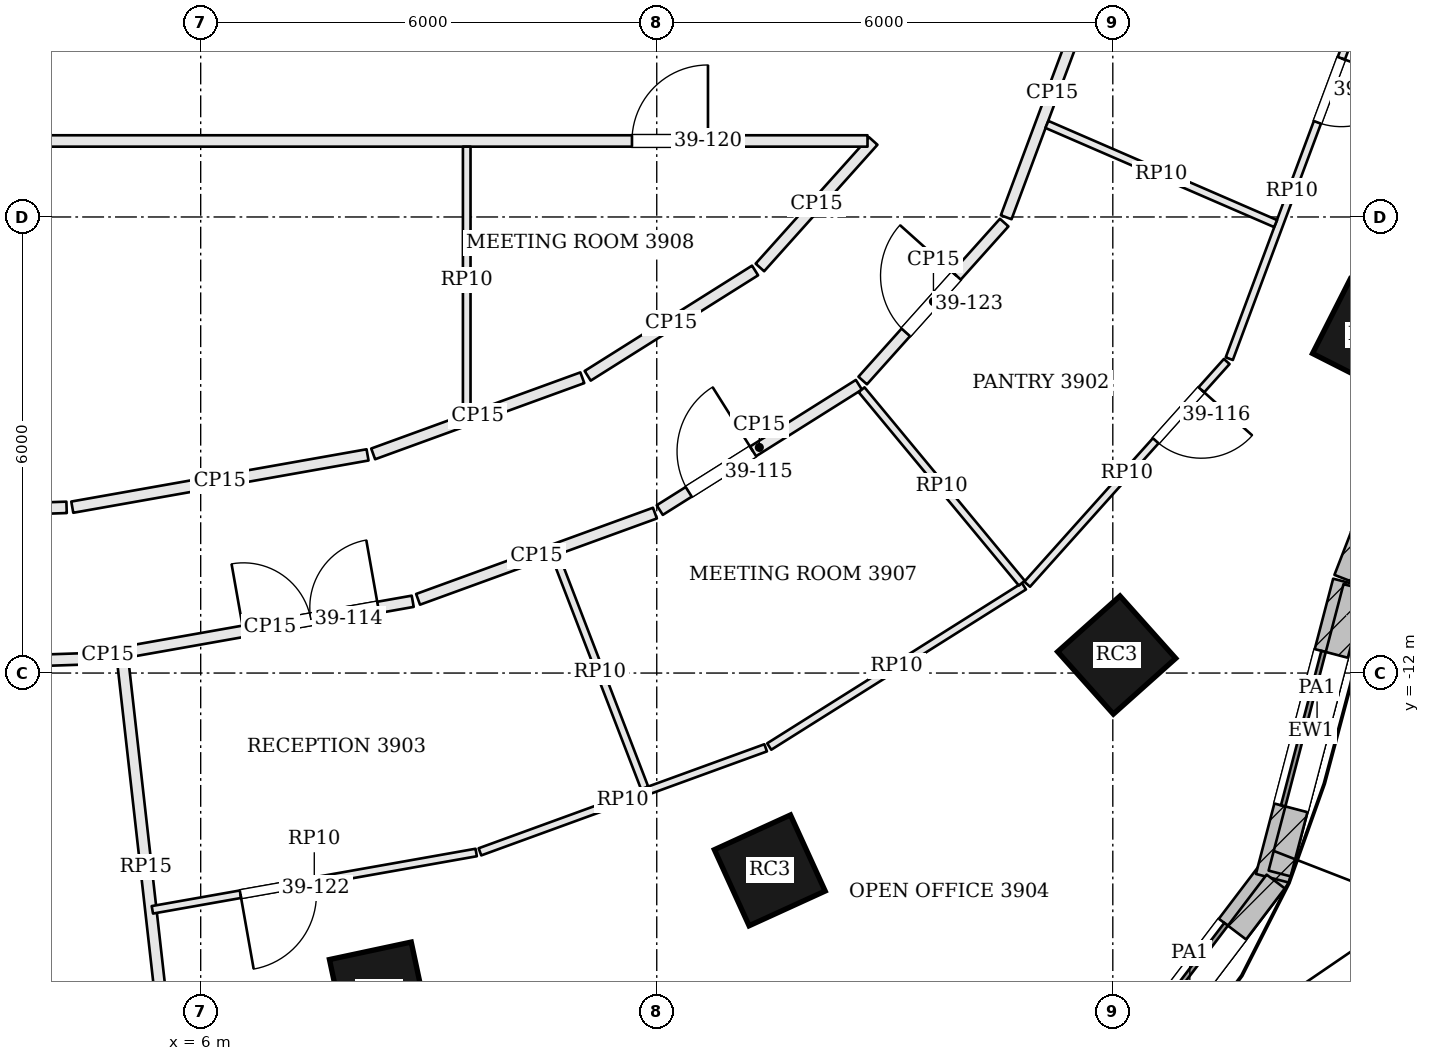
"""IFC4 building model, lengths in metres.
Left out: names, types, materials, properties, quantities, classifications, styles, units other than length and angle.
Written with IfcOpenShell. Run it as: python <this file> out.ifc"""

import sys

from ifc_helpers import new_model, si_unit, direction, frame, frame_2d, origin, origin_2d, place, context, subcontext, project, spatial, rectangle, extrude, element, fill, save


model = new_model("IFC4")
c1 = context("Model", 3, precision=1e-05, world=origin(), true_north=direction((0.0, 1.0)))
c2 = subcontext(c1, "Body", "Model", "MODEL_VIEW")
j1 = project(units=[si_unit("LENGTHUNIT", "METRE"), si_unit("PLANEANGLEUNIT", "RADIAN")], contexts=[c1])
p1 = place(None, origin())
s1 = spatial("IfcSite", under=j1, at=p1, CompositionType="ELEMENT")
p2 = place(p1, origin())
s2 = spatial("IfcBuilding", under=s1, at=p2, CompositionType="ELEMENT")
p3 = place(p2, frame((0.0, 0.0, 161.7)))
s3 = spatial("IfcBuildingStorey", under=s2, at=p3, CompositionType="ELEMENT", Elevation=161.7)
for number, where, z_axis, x_axis in (
    (1, (8.347, -16.192, 0.0), (0.0, 0.0, 1.0), (0.978, 0.209, 0.0)),
    (2, (13.487, -14.596, 0.0), (0.0, 0.0, 1.0), (0.91, 0.415, 0.0)),
    (3, (18.051, -11.763, 0.0), (0.0, 0.0, 1.0), (0.746, 0.666, 0.0)),
    (4, (21.367, -7.554, 0.0), (0.0, 0.0, 1.0), (0.452, 0.892, 0.0)),
):
    element("IfcColumn", number, at=place(p3, frame(where, z_axis=z_axis, x_axis=x_axis)), inside=s3, PredefinedType="COLUMN", context=c2, shape_type="SweptSolid", body=[
        extrude(rectangle(XDim=1.1, YDim=1.1, at=origin_2d()), origin(), (0.0, 0.0, 1.0), 3.9),
    ])
p4 = place(p3, frame((17.741, -17.784, 0.0), z_axis=(0.0, 0.0, 1.0), x_axis=(0.604591324894, 0.796535830872, 0.0)))
e5 = element("IfcWall", 5, at=p4, inside=s3, PredefinedType="SOLIDWALL", context=c2, shape_type="SweptSolid", body=[
    extrude(rectangle(XDim=3.965, YDim=0.45, at=frame_2d((1.982, 0.0))), origin(), (0.0, 0.0, 1.0), 3.7),
])
p5 = place(p4, frame((0.932, 0.0, 0.9)))
e6 = element("IfcOpeningElement", 6, at=p5, cuts=e5, PredefinedType="OPENING", context=c2, shape_type="SweptSolid", body=[
    extrude(rectangle(XDim=2.1, YDim=2.3, at=frame_2d((1.05, 1.15))), frame((0.0, 0.235, 0.0), z_axis=(0.0, -1.0, 0.0), x_axis=(1.0, 0.0, 0.0)), (0.0, 0.0, 1.0), 0.47),
])
p6 = place(p3, frame((20.101, -14.7, 0.0), z_axis=(0.0, 0.0, 1.0), x_axis=(0.253050507365, 0.967453069003, 0.0)))
e7 = element("IfcWall", 7, at=p6, inside=s3, PredefinedType="SOLIDWALL", context=c2, shape_type="SweptSolid", body=[
    extrude(rectangle(XDim=4.015, YDim=0.45, at=frame_2d((2.008, 0.0))), origin(), (0.0, 0.0, 1.0), 3.7),
])
p7 = place(p6, frame((0.958, 0.0, 0.9)))
e8 = element("IfcOpeningElement", 8, at=p7, cuts=e7, PredefinedType="OPENING", context=c2, shape_type="SweptSolid", body=[
    extrude(rectangle(XDim=2.1, YDim=2.3, at=frame_2d((1.05, 1.15))), frame((0.0, 0.235, 0.0), z_axis=(0.0, -1.0, 0.0), x_axis=(1.0, 0.0, 0.0)), (0.0, 0.0, 1.0), 0.47),
])
p8 = place(p3, frame((21.125, -10.79, 0.0), z_axis=(0.0, 0.0, 1.0), x_axis=(0.361550075906, 0.932352692178, 0.0)))
e9 = element("IfcWall", 9, at=p8, inside=s3, PredefinedType="SOLIDWALL", context=c2, shape_type="SweptSolid", body=[
    extrude(rectangle(XDim=3.313, YDim=0.45, at=frame_2d((1.657, 0.0))), origin(), (0.0, 0.0, 1.0), 3.7),
])
p9 = place(p8, frame((0.607, 0.0, 0.9)))
e10 = element("IfcOpeningElement", 10, at=p9, cuts=e9, PredefinedType="OPENING", context=c2, shape_type="SweptSolid", body=[
    extrude(rectangle(XDim=2.1, YDim=2.3, at=frame_2d((1.05, 1.15))), frame((0.0, 0.235, 0.0), z_axis=(0.0, -1.0, 0.0), x_axis=(1.0, 0.0, 0.0)), (0.0, 0.0, 1.0), 0.47),
])
p10 = place(p3, frame((17.883, -17.721, 3.9), z_axis=(0.0, 0.0, 1.0), x_axis=(0.60459800049, 0.796530763878, 0.0)))
e11 = element("IfcWall", 11, at=p10, inside=s3, PredefinedType="PARAPET", context=c2, shape_type="SweptSolid", body=[
    extrude(rectangle(XDim=3.739, YDim=0.3, at=frame_2d((1.869, 0.0))), origin(), (0.0, 0.0, 1.0), 1.1),
])
p11 = place(p3, frame((20.195, -14.637, 3.9), z_axis=(0.0, 0.0, 1.0), x_axis=(0.253006085487, 0.967464687059, 0.0)))
e12 = element("IfcWall", 12, at=p11, inside=s3, PredefinedType="PARAPET", context=c2, shape_type="SweptSolid", body=[
    extrude(rectangle(XDim=3.896, YDim=0.3, at=frame_2d((1.948, 0.0))), origin(), (0.0, 0.0, 1.0), 1.1),
])
p12 = place(p3, frame((-0.875, -11.993, 0.0), z_axis=(0.0, 0.0, 1.0), x_axis=(0.999436745295, 0.033558786542, 0.0)))
e13 = element("IfcWall", 13, at=p12, inside=s3, PredefinedType="PARTITIONING", context=c2, shape_type="SweptSolid", body=[
    extrude(rectangle(XDim=5.398, YDim=0.15, at=frame_2d((2.699, 0.0))), origin(), (0.0, 0.0, 1.0), 3.198),
])
p13 = place(p3, frame((4.594, -11.799, 0.0), z_axis=(0.0, 0.0, 1.0), x_axis=(0.9846521594, 0.174528292804, 0.0)))
e14 = element("IfcWall", 14, at=p13, inside=s3, PredefinedType="PARTITIONING", context=c2, shape_type="SweptSolid", body=[
    extrude(rectangle(XDim=0.375, YDim=0.15, at=frame_2d((0.188, 0.0))), origin(), (0.0, 0.0, 1.0), 3.198),
])
p14 = place(p3, frame((5.59, -17.294, 0.0), z_axis=(0.0, 0.0, 1.0), x_axis=(-0.112008739425, 0.993707221616, 0.0)))
e15 = element("IfcWall", 15, at=p14, inside=s3, PredefinedType="PARTITIONING", context=c2, shape_type="SweptSolid", body=[
    extrude(rectangle(XDim=5.521, YDim=0.15, at=frame_2d((2.76, 0.0))), origin(), (0.0, 0.0, 1.0), 3.234),
])
p15 = place(p3, frame((5.037, -11.72, 0.0), z_axis=(0.0, 0.0, 1.0), x_axis=(0.984690550414, 0.17431155993, 0.0)))
e16 = element("IfcWall", 16, at=p15, inside=s3, PredefinedType="PARTITIONING", context=c2, shape_type="SweptSolid", body=[
    extrude(rectangle(XDim=3.811, YDim=0.15, at=frame_2d((1.906, 0.0))), origin(), (0.0, 0.0, 1.0), 3.198),
])
p16 = place(p15, frame((1.55, 0.0, 0.0)))
e17 = element("IfcOpeningElement", 17, at=p16, cuts=e16, PredefinedType="OPENING", context=c2, shape_type="SweptSolid", body=[
    extrude(rectangle(XDim=1.8, YDim=2.1, at=frame_2d((0.9, 1.05))), frame((0.0, 0.085, 0.0), z_axis=(0.0, -1.0, 0.0), x_axis=(1.0, 0.0, 0.0)), (0.0, 0.0, 1.0), 0.17),
])
p17 = place(p3, frame((8.86, -11.03, 0.0), z_axis=(0.0, 0.0, 1.0), x_axis=(0.939685902536, 0.342038601001, 0.0)))
e18 = element("IfcWall", 18, at=p17, inside=s3, PredefinedType="PARTITIONING", context=c2, shape_type="SweptSolid", body=[
    extrude(rectangle(XDim=3.316, YDim=0.15, at=frame_2d((1.658, 0.0))), origin(), (0.0, 0.0, 1.0), 3.198),
])
p18 = place(p3, frame((12.04, -9.856, 0.0), z_axis=(0.0, 0.0, 1.0), x_axis=(0.846394809937, 0.532555936697, 0.0)))
e19 = element("IfcWall", 19, at=p18, inside=s3, PredefinedType="PARTITIONING", context=c2, shape_type="SweptSolid", body=[
    extrude(rectangle(XDim=3.095, YDim=0.15, at=frame_2d((1.548, 0.0))), origin(), (0.0, 0.0, 1.0), 3.198),
])
p19 = place(p18, frame((0.45, 0.0, 0.0)))
e20 = element("IfcOpeningElement", 20, at=p19, cuts=e19, PredefinedType="OPENING", context=c2, shape_type="SweptSolid", body=[
    extrude(rectangle(XDim=1.0, YDim=2.4, at=frame_2d((0.5, 1.2))), frame((0.0, 0.085, 0.0), z_axis=(0.0, -1.0, 0.0), x_axis=(1.0, 0.0, 0.0)), (0.0, 0.0, 1.0), 0.17),
])
p20 = place(p3, frame((14.709, -8.152, 0.0), z_axis=(0.0, 0.0, 1.0), x_axis=(0.667275630306, 0.744810870758, 0.0)))
e21 = element("IfcWall", 21, at=p20, inside=s3, PredefinedType="PARTITIONING", context=c2, shape_type="SweptSolid", body=[
    extrude(rectangle(XDim=2.79, YDim=0.15, at=frame_2d((1.395, 0.0))), origin(), (0.0, 0.0, 1.0), 3.198),
])
p21 = place(p20, frame((0.85, 0.0, 0.0)))
e22 = element("IfcOpeningElement", 22, at=p21, cuts=e21, PredefinedType="OPENING", context=c2, shape_type="SweptSolid", body=[
    extrude(rectangle(XDim=1.0, YDim=2.1, at=frame_2d((0.5, 1.05))), frame((0.0, 0.085, 0.0), z_axis=(0.0, -1.0, 0.0), x_axis=(1.0, 0.0, 0.0)), (0.0, 0.0, 1.0), 0.17),
])
p22 = place(p3, frame((16.597, -6.003, 0.0), z_axis=(0.0, 0.0, 1.0), x_axis=(0.349499455299, 0.936936567088, 0.0)))
e23 = element("IfcWall", 23, at=p22, inside=s3, PredefinedType="PARTITIONING", context=c2, shape_type="SweptSolid", body=[
    extrude(rectangle(XDim=3.477, YDim=0.15, at=frame_2d((1.739, 0.0))), origin(), (0.0, 0.0, 1.0), 3.198),
])
p23 = place(p3, frame((14.848, -5.0, 0.0), z_axis=(0.0, 0.0, 1.0), x_axis=(-0.667363249373, -0.744732363595, 0.0)))
e24 = element("IfcWall", 24, at=p23, inside=s3, PredefinedType="PARTITIONING", context=c2, shape_type="SweptSolid", body=[
    extrude(rectangle(XDim=2.234, YDim=0.15, at=frame_2d((1.117, 0.0))), origin(), (0.0, 0.0, 1.0), 3.198),
])
p24 = place(p3, frame((13.293, -6.704, 0.0), z_axis=(0.0, 0.0, 1.0), x_axis=(-0.84641299998, -0.532527026041, 0.0)))
e25 = element("IfcWall", 25, at=p24, inside=s3, PredefinedType="PARTITIONING", context=c2, shape_type="SweptSolid", body=[
    extrude(rectangle(XDim=2.602, YDim=0.15, at=frame_2d((1.301, 0.0))), origin(), (0.0, 0.0, 1.0), 3.198),
])
p25 = place(p3, frame((11.021, -8.115, 0.0), z_axis=(0.0, 0.0, 1.0), x_axis=(-0.939683845313, -0.342044252778, 0.0)))
e26 = element("IfcWall", 26, at=p25, inside=s3, PredefinedType="PARTITIONING", context=c2, shape_type="SweptSolid", body=[
    extrude(rectangle(XDim=2.929, YDim=0.15, at=frame_2d((1.464, 0.0))), origin(), (0.0, 0.0, 1.0), 3.198),
])
p26 = place(p3, frame((8.195, -9.13, 0.0), z_axis=(0.0, 0.0, 1.0), x_axis=(-0.9846880937, -0.174325437403, 0.0)))
e27 = element("IfcWall", 27, at=p26, inside=s3, PredefinedType="PARTITIONING", context=c2, shape_type="SweptSolid", body=[
    extrude(rectangle(XDim=3.945, YDim=0.15, at=frame_2d((1.973, 0.0))), origin(), (0.0, 0.0, 1.0), 3.198),
])
p27 = place(p3, frame((4.236, -9.82, 0.0), z_axis=(0.0, 0.0, 1.0), x_axis=(-0.999435760561, -0.033588100749, 0.0)))
e28 = element("IfcWall", 28, at=p27, inside=s3, PredefinedType="PARTITIONING", context=c2, shape_type="SweptSolid", body=[
    extrude(rectangle(XDim=5.146, YDim=0.15, at=frame_2d((2.573, 0.0))), origin(), (0.0, 0.0, 1.0), 3.198),
])
p28 = place(p3, frame((-14.789, -5.0, 0.0), z_axis=(0.0, 0.0, 1.0), x_axis=(1.0, 0.0, 0.0)))
e29 = element("IfcWall", 29, at=p28, inside=s3, PredefinedType="PARTITIONING", context=c2, shape_type="SweptSolid", body=[
    extrude(rectangle(XDim=29.562, YDim=0.15, at=frame_2d((14.781, 0.0))), origin(), (0.0, 0.0, 1.0), 3.198),
])
p29 = place(p28, frame((2.107, 0.0, 0.0)))
e30 = element("IfcOpeningElement", 30, at=p29, cuts=e29, PredefinedType="OPENING", context=c2, shape_type="SweptSolid", body=[
    extrude(rectangle(XDim=1.0, YDim=2.1, at=frame_2d((0.5, 1.05))), frame((0.0, 0.085, 0.0), z_axis=(0.0, -1.0, 0.0), x_axis=(1.0, 0.0, 0.0)), (0.0, 0.0, 1.0), 0.17),
])
p30 = place(p28, frame((13.889, 0.0, 0.0)))
e31 = element("IfcOpeningElement", 31, at=p30, cuts=e29, PredefinedType="OPENING", context=c2, shape_type="SweptSolid", body=[
    extrude(rectangle(XDim=1.8, YDim=2.1, at=frame_2d((0.9, 1.05))), frame((0.0, 0.085, 0.0), z_axis=(0.0, -1.0, 0.0), x_axis=(1.0, 0.0, 0.0)), (0.0, 0.0, 1.0), 0.17),
])
p31 = place(p28, frame((26.463, 0.0, 0.0)))
e32 = element("IfcOpeningElement", 32, at=p31, cuts=e29, PredefinedType="OPENING", context=c2, shape_type="SweptSolid", body=[
    extrude(rectangle(XDim=1.0, YDim=2.4, at=frame_2d((0.5, 1.2))), frame((0.0, 0.085, 0.0), z_axis=(0.0, -1.0, 0.0), x_axis=(1.0, 0.0, 0.0)), (0.0, 0.0, 1.0), 0.17),
])
p32 = place(p3, frame((21.181, -3.443, 0.0), z_axis=(0.0, 0.0, 1.0), x_axis=(-0.349438657616, -0.936959243811, 0.0)))
e33 = element("IfcWall", 33, at=p32, inside=s3, PredefinedType="PARTITIONING", context=c2, shape_type="SweptSolid", body=[
    extrude(rectangle(XDim=4.718, YDim=0.1, at=frame_2d((2.359, 0.0))), origin(), (0.0, 0.0, 1.0), 3.198),
])
p33 = place(p32, frame((0.5, 0.0, 0.0)))
e34 = element("IfcOpeningElement", 34, at=p33, cuts=e33, PredefinedType="OPENING", context=c2, shape_type="SweptSolid", body=[
    extrude(rectangle(XDim=0.9, YDim=2.1, at=frame_2d((0.45, 1.05))), frame((0.0, 0.06, 0.0), z_axis=(0.0, -1.0, 0.0), x_axis=(1.0, 0.0, 0.0)), (0.0, 0.0, 1.0), 0.12),
])
p34 = place(p3, frame((19.499, -7.901, 0.0), z_axis=(0.0, 0.0, 1.0), x_axis=(-0.667320762971, -0.744770433964, 0.0)))
e35 = element("IfcWall", 35, at=p34, inside=s3, PredefinedType="PARTITIONING", context=c2, shape_type="SweptSolid", body=[
    extrude(rectangle(XDim=3.934, YDim=0.1, at=frame_2d((1.967, 0.0))), origin(), (0.0, 0.0, 1.0), 3.198),
])
p35 = place(p34, frame((0.5, 0.0, 0.0)))
e36 = element("IfcOpeningElement", 36, at=p35, cuts=e35, PredefinedType="OPENING", context=c2, shape_type="SweptSolid", body=[
    extrude(rectangle(XDim=0.9, YDim=2.1, at=frame_2d((0.45, 1.05))), frame((0.0, 0.06, 0.0), z_axis=(0.0, -1.0, 0.0), x_axis=(1.0, 0.0, 0.0)), (0.0, 0.0, 1.0), 0.12),
])
p36 = place(p3, frame((16.831, -10.858, 0.0), z_axis=(0.0, 0.0, 1.0), x_axis=(-0.846415033443, -0.532523793987, 0.0)))
e37 = element("IfcWall", 37, at=p36, inside=s3, PredefinedType="PARTITIONING", context=c2, shape_type="SweptSolid", body=[
    extrude(rectangle(XDim=3.96, YDim=0.1, at=frame_2d((1.98, 0.0))), origin(), (0.0, 0.0, 1.0), 3.198),
])
p37 = place(p3, frame((13.433, -12.984, 0.0), z_axis=(0.0, 0.0, 1.0), x_axis=(-0.939673979614, -0.342071355182, 0.0)))
e38 = element("IfcWall", 38, at=p37, inside=s3, PredefinedType="PARTITIONING", context=c2, shape_type="SweptSolid", body=[
    extrude(rectangle(XDim=4.0, YDim=0.1, at=frame_2d((2.0, 0.0))), origin(), (0.0, 0.0, 1.0), 3.198),
])
p38 = place(p3, frame((9.625, -14.361, 0.0), z_axis=(0.0, 0.0, 1.0), x_axis=(-0.984692536401, -0.174300340665, 0.0)))
e39 = element("IfcWall", 39, at=p38, inside=s3, PredefinedType="PARTITIONING", context=c2, shape_type="SweptSolid", body=[
    extrude(rectangle(XDim=4.327, YDim=0.1, at=frame_2d((2.163, 0.0))), origin(), (0.0, 0.0, 1.0), 3.198),
])
p39 = place(p38, frame((2.15, 0.0, 0.0)))
e40 = element("IfcOpeningElement", 40, at=p39, cuts=e39, PredefinedType="OPENING", context=c2, shape_type="SweptSolid", body=[
    extrude(rectangle(XDim=1.0, YDim=2.1, at=frame_2d((0.5, 1.05))), frame((0.0, 0.06, 0.0), z_axis=(0.0, -1.0, 0.0), x_axis=(1.0, 0.0, 0.0)), (0.0, 0.0, 1.0), 0.12),
])
p40 = place(p3, frame((10.663, -10.454, 0.0), z_axis=(0.0, 0.0, 1.0), x_axis=(0.359408579013, -0.933180300548, 0.0)))
e41 = element("IfcWall", 41, at=p40, inside=s3, PredefinedType="PARTITIONING", context=c2, shape_type="SweptSolid", body=[
    extrude(rectangle(XDim=3.275, YDim=0.1, at=frame_2d((1.638, 0.0))), origin(), (0.0, 0.0, 1.0), 3.198),
])
p41 = place(p3, frame((14.695, -8.273, 0.0), z_axis=(0.0, 0.0, 1.0), x_axis=(0.638037892731, -0.770004965854, 0.0)))
e42 = element("IfcWall", 42, at=p41, inside=s3, PredefinedType="PARTITIONING", context=c2, shape_type="SweptSolid", body=[
    extrude(rectangle(XDim=3.304, YDim=0.1, at=frame_2d((1.652, 0.0))), origin(), (0.0, 0.0, 1.0), 3.198),
])
p42 = place(p3, frame((17.133, -4.782, 0.0), z_axis=(0.0, 0.0, 1.0), x_axis=(0.917457823469, -0.397833058148, 0.0)))
e43 = element("IfcWall", 43, at=p42, inside=s3, PredefinedType="PARTITIONING", context=c2, shape_type="SweptSolid", body=[
    extrude(rectangle(XDim=3.28, YDim=0.1, at=frame_2d((1.64, 0.0))), origin(), (0.0, 0.0, 1.0), 3.198),
])
p43 = place(p3, frame((9.5, -8.594, 0.0), z_axis=(0.0, 0.0, 1.0), x_axis=(0.0, 1.0, 0.0)))
e44 = element("IfcWall", 44, at=p43, inside=s3, PredefinedType="PARTITIONING", context=c2, shape_type="SweptSolid", body=[
    extrude(rectangle(XDim=3.519, YDim=0.1, at=frame_2d((1.759, 0.0))), origin(), (0.0, 0.0, 1.0), 3.198),
])
p44 = place(p5, origin())
e45 = element("IfcWindow", 45, at=p44, inside=s3, PartitioningType="SINGLE_PANEL", PredefinedType="WINDOW", context=c2, shape_type="SweptSolid", body=[
    extrude(rectangle(XDim=2.1, YDim=2.3, at=frame_2d((1.05, 1.15))), frame((0.0, 0.135, 0.0), z_axis=(0.0, -1.0, 0.0), x_axis=(1.0, 0.0, 0.0)), (0.0, 0.0, 1.0), 0.06),
])
fill(e6, e45)
p45 = place(p7, origin())
e46 = element("IfcWindow", 46, at=p45, inside=s3, PartitioningType="SINGLE_PANEL", PredefinedType="WINDOW", context=c2, shape_type="SweptSolid", body=[
    extrude(rectangle(XDim=2.1, YDim=2.3, at=frame_2d((1.05, 1.15))), frame((0.0, 0.135, 0.0), z_axis=(0.0, -1.0, 0.0), x_axis=(1.0, 0.0, 0.0)), (0.0, 0.0, 1.0), 0.06),
])
fill(e8, e46)
p46 = place(p16, origin())
e47 = element("IfcDoor", 47, at=p46, inside=s3, OperationType="DOUBLE_DOOR_SINGLE_SWING", PredefinedType="DOOR", context=c2, shape_type="SweptSolid", body=[
    extrude(rectangle(XDim=1.8, YDim=2.1, at=frame_2d((0.9, 1.05))), frame((0.0, 0.025, 0.0), z_axis=(0.0, -1.0, 0.0), x_axis=(1.0, 0.0, 0.0)), (0.0, 0.0, 1.0), 0.05),
])
fill(e17, e47)
p47 = place(p19, origin())
e48 = element("IfcDoor", 48, at=p47, inside=s3, OperationType="SINGLE_SWING_RIGHT", PredefinedType="DOOR", context=c2, shape_type="SweptSolid", body=[
    extrude(rectangle(XDim=1.0, YDim=2.4, at=frame_2d((0.5, 1.2))), frame((0.0, 0.025, 0.0), z_axis=(0.0, -1.0, 0.0), x_axis=(1.0, 0.0, 0.0)), (0.0, 0.0, 1.0), 0.05),
])
fill(e20, e48)
p48 = place(p35, origin())
e49 = element("IfcDoor", 49, at=p48, inside=s3, OperationType="SINGLE_SWING_LEFT", PredefinedType="DOOR", context=c2, shape_type="SweptSolid", body=[
    extrude(rectangle(XDim=0.9, YDim=2.1, at=frame_2d((0.45, 1.05))), frame((0.0, 0.025, 0.0), z_axis=(0.0, -1.0, 0.0), x_axis=(1.0, 0.0, 0.0)), (0.0, 0.0, 1.0), 0.05),
])
fill(e36, e49)
p49 = place(p33, origin())
e50 = element("IfcDoor", 50, at=p49, inside=s3, OperationType="SINGLE_SWING_LEFT", PredefinedType="DOOR", context=c2, shape_type="SweptSolid", body=[
    extrude(rectangle(XDim=0.9, YDim=2.1, at=frame_2d((0.45, 1.05))), frame((0.0, 0.025, 0.0), z_axis=(0.0, -1.0, 0.0), x_axis=(1.0, 0.0, 0.0)), (0.0, 0.0, 1.0), 0.05),
])
fill(e34, e50)
p50 = place(p31, origin())
e51 = element("IfcDoor", 51, at=p50, inside=s3, OperationType="SINGLE_SWING_RIGHT", PredefinedType="DOOR", context=c2, shape_type="SweptSolid", body=[
    extrude(rectangle(XDim=1.0, YDim=2.4, at=frame_2d((0.5, 1.2))), frame((0.0, 0.025, 0.0), z_axis=(0.0, -1.0, 0.0), x_axis=(1.0, 0.0, 0.0)), (0.0, 0.0, 1.0), 0.05),
])
fill(e32, e51)
p51 = place(p39, origin())
e52 = element("IfcDoor", 52, at=p51, inside=s3, OperationType="SINGLE_SWING_RIGHT", PredefinedType="DOOR", context=c2, shape_type="SweptSolid", body=[
    extrude(rectangle(XDim=1.0, YDim=2.1, at=frame_2d((0.5, 1.05))), frame((0.0, 0.025, 0.0), z_axis=(0.0, -1.0, 0.0), x_axis=(1.0, 0.0, 0.0)), (0.0, 0.0, 1.0), 0.05),
])
fill(e40, e52)
p52 = place(p21, origin())
e53 = element("IfcDoor", 53, at=p52, inside=s3, OperationType="SINGLE_SWING_RIGHT", PredefinedType="DOOR", context=c2, shape_type="SweptSolid", body=[
    extrude(rectangle(XDim=1.0, YDim=2.1, at=frame_2d((0.5, 1.05))), frame((0.0, 0.025, 0.0), z_axis=(0.0, -1.0, 0.0), x_axis=(1.0, 0.0, 0.0)), (0.0, 0.0, 1.0), 0.05),
])
fill(e22, e53)
save(model, sys.argv[1])
